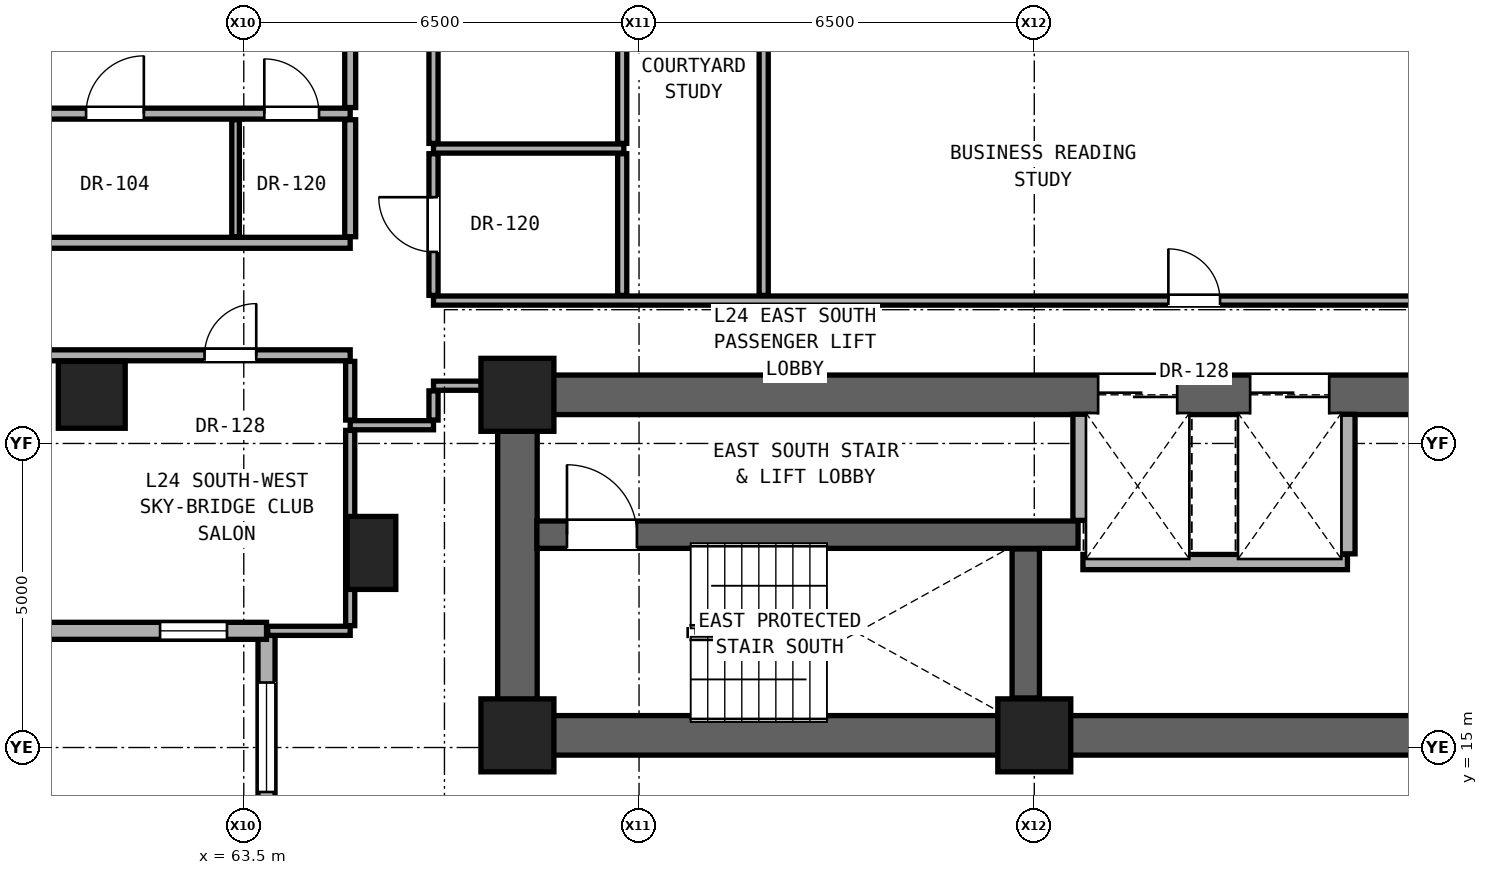
"""IFC4 building model, lengths in metres.
Left out: names, types, materials, properties, quantities, classifications, styles, units other than length and angle.
Written with IfcOpenShell. Run it as: python <this file> out.ifc"""

import sys

from ifc_helpers import new_model, si_unit, direction, frame, frame_2d, origin, origin_2d, place, context, subcontext, project, spatial, rectangle, hollow_rectangle, extrude, element, fill, save


model = new_model("IFC4")
c1 = context("Model", 3, precision=1e-05, world=origin(), true_north=direction((0.0, 1.0)))
c2 = subcontext(c1, "Body", "Model", "MODEL_VIEW")
j1 = project(units=[si_unit("LENGTHUNIT", "METRE"), si_unit("PLANEANGLEUNIT", "RADIAN")], contexts=[c1])
p1 = place(None, origin())
s1 = spatial("IfcSite", under=j1, at=p1, CompositionType="ELEMENT")
p2 = place(p1, origin())
s2 = spatial("IfcBuilding", under=s1, at=p2, CompositionType="ELEMENT")
p3 = place(p2, frame((0.0, 0.0, 88.4)))
s3 = spatial("IfcBuildingStorey", under=s2, at=p3, CompositionType="ELEMENT", Elevation=88.4)
for number, where, z_axis, x_axis in (
    (1, (68.0, 15.2, 0.0), (0.0, 0.0, 1.0), (1.0, 0.0, 0.0)),
    (2, (76.5, 15.2, 0.0), (0.0, 0.0, 1.0), (1.0, 0.0, 0.0)),
    (3, (68.0, 20.8, 0.0), (0.0, 0.0, 1.0), (1.0, 0.0, 0.0)),
):
    element("IfcColumn", number, at=place(p3, frame(where, z_axis=z_axis, x_axis=x_axis)), inside=s3, PredefinedType="COLUMN", context=c2, shape_type="SweptSolid", body=[
        extrude(rectangle(XDim=1.2, YDim=1.2, at=origin_2d()), origin(), (0.0, 0.0, 1.0), 3.3),
    ])
p4 = place(p3, frame((61.0, 20.8, 0.0), z_axis=(0.0, 0.0, 1.0), x_axis=(1.0, 0.0, 0.0)))
e4 = element("IfcColumn", 4, at=p4, inside=s3, PredefinedType="COLUMN", context=c2, shape_type="SweptSolid", body=[
    extrude(hollow_rectangle(XDim=1.1, YDim=1.1, WallThickness=0.06, at=origin_2d()), origin(), (0.0, 0.0, 1.0), 3.3),
])
p5 = place(p3, frame((65.6, 18.2, 0.0), z_axis=(0.0, 0.0, 1.0), x_axis=(1.0, 0.0, 0.0)))
e5 = element("IfcColumn", 5, at=p5, inside=s3, PredefinedType="PILASTER", context=c2, shape_type="SweptSolid", body=[
    extrude(rectangle(XDim=0.8, YDim=1.2, at=origin_2d()), origin(), (0.0, 0.0, 1.0), 3.3),
])
p6 = place(p3, frame((68.0, 15.2, 0.0), z_axis=(0.0, 0.0, 1.0), x_axis=(1.0, 0.0, 0.0)))
e6 = element("IfcWall", 6, at=p6, inside=s3, PredefinedType="SHEAR", context=c2, shape_type="SweptSolid", body=[
    extrude(rectangle(XDim=17.0, YDim=0.65, at=frame_2d((8.5, 0.0))), origin(), (0.0, 0.0, 1.0), 3.08),
])
p7 = place(p3, frame((68.0, 15.2, 0.0), z_axis=(0.0, 0.0, 1.0), x_axis=(0.0, 1.0, 0.0)))
e7 = element("IfcWall", 7, at=p7, inside=s3, PredefinedType="SHEAR", context=c2, shape_type="SweptSolid", body=[
    extrude(rectangle(XDim=5.6, YDim=0.65, at=frame_2d((2.8, 0.0))), origin(), (0.0, 0.0, 1.0), 3.08),
])
p8 = place(p3, frame((68.0, 20.8, 0.0), z_axis=(0.0, 0.0, 1.0), x_axis=(1.0, 0.0, 0.0)))
e8 = element("IfcWall", 8, at=p8, inside=s3, PredefinedType="SHEAR", context=c2, shape_type="SweptSolid", body=[
    extrude(rectangle(XDim=17.0, YDim=0.65, at=frame_2d((8.5, 0.0))), origin(), (0.0, 0.0, 1.0), 3.08),
])
p9 = place(p8, frame((9.55, 0.0, 0.0)))
e9 = element("IfcOpeningElement", 9, at=p9, cuts=e8, PredefinedType="OPENING", context=c2, shape_type="SweptSolid", body=[
    extrude(rectangle(XDim=1.3, YDim=2.3, at=frame_2d((0.65, 1.15))), frame((0.0, 0.335, 0.0), z_axis=(0.0, -1.0, 0.0), x_axis=(1.0, 0.0, 0.0)), (0.0, 0.0, 1.0), 0.67),
])
p10 = place(p8, frame((12.05, 0.0, 0.0)))
e10 = element("IfcOpeningElement", 10, at=p10, cuts=e8, PredefinedType="OPENING", context=c2, shape_type="SweptSolid", body=[
    extrude(rectangle(XDim=1.3, YDim=2.3, at=frame_2d((0.65, 1.15))), frame((0.0, 0.335, 0.0), z_axis=(0.0, -1.0, 0.0), x_axis=(1.0, 0.0, 0.0)), (0.0, 0.0, 1.0), 0.67),
])
p11 = place(p3, frame((63.874, 16.919, 0.0), z_axis=(0.0, 0.0, 1.0), x_axis=(0.0, -1.0, 0.0)))
e11 = element("IfcWall", 11, at=p11, inside=s3, PredefinedType="SOLIDWALL", context=c2, shape_type="SweptSolid", body=[
    extrude(rectangle(XDim=4.516, YDim=0.28, at=frame_2d((2.258, 0.0))), origin(), (0.0, 0.0, 1.0), 3.06),
])
p12 = place(p11, frame((0.85, 0.0, 0.81)))
e12 = element("IfcOpeningElement", 12, at=p12, cuts=e11, PredefinedType="OPENING", context=c2, shape_type="SweptSolid", body=[
    extrude(rectangle(XDim=1.8, YDim=2.1, at=frame_2d((0.9, 1.05))), frame((0.0, 0.15, 0.0), z_axis=(0.0, -1.0, 0.0), x_axis=(1.0, 0.0, 0.0)), (0.0, 0.0, 1.0), 0.3),
])
p13 = place(p3, frame((59.357, 16.919, 0.0), z_axis=(0.0, 0.0, 1.0), x_axis=(1.0, 0.0, 0.0)))
e13 = element("IfcWall", 13, at=p13, inside=s3, PredefinedType="SOLIDWALL", context=c2, shape_type="SweptSolid", body=[
    extrude(rectangle(XDim=4.516, YDim=0.28, at=frame_2d((2.258, 0.0))), origin(), (0.0, 0.0, 1.0), 3.06),
])
p14 = place(p13, frame((2.766, 0.0, 0.85)))
e14 = element("IfcOpeningElement", 14, at=p14, cuts=e13, PredefinedType="OPENING", context=c2, shape_type="SweptSolid", body=[
    extrude(rectangle(XDim=1.1, YDim=2.0, at=frame_2d((0.55, 1.0))), frame((0.0, 0.15, 0.0), z_axis=(0.0, -1.0, 0.0), x_axis=(1.0, 0.0, 0.0)), (0.0, 0.0, 1.0), 0.3),
])
p15 = place(p3, frame((63.894, 16.919, 0.0), z_axis=(0.0, 0.0, 1.0), x_axis=(1.0, 0.0, 0.0)))
e15 = element("IfcWall", 15, at=p15, inside=s3, PredefinedType="PARTITIONING", context=c2, shape_type="SweptSolid", body=[
    extrude(rectangle(XDim=1.356, YDim=0.15, at=frame_2d((0.678, 0.0))), origin(), (0.0, 0.0, 1.0), 3.08),
])
p16 = place(p3, frame((77.3, 18.05, 0.0), z_axis=(0.0, 0.0, 1.0), x_axis=(1.0, 0.0, 0.0)))
e16 = element("IfcWall", 16, at=p16, inside=s3, PredefinedType="SOLIDWALL", context=c2, shape_type="SweptSolid", body=[
    extrude(rectangle(XDim=4.35, YDim=0.25, at=frame_2d((2.175, 0.0))), origin(), (0.0, 0.0, 1.0), 3.08),
])
p17 = place(p3, frame((68.32, 18.5, 0.0), z_axis=(0.0, 0.0, 1.0), x_axis=(1.0, 0.0, 0.0)))
e17 = element("IfcWall", 17, at=p17, inside=s3, PredefinedType="SHEAR", context=c2, shape_type="SweptSolid", body=[
    extrude(rectangle(XDim=8.9, YDim=0.45, at=frame_2d((4.45, 0.0))), origin(), (0.0, 0.0, 1.0), 3.08),
])
p18 = place(p17, frame((0.495, 0.0, 0.0)))
e18 = element("IfcOpeningElement", 18, at=p18, cuts=e17, PredefinedType="OPENING", context=c2, shape_type="SweptSolid", body=[
    extrude(rectangle(XDim=1.15, YDim=2.2, at=frame_2d((0.575, 1.1))), frame((0.0, 0.235, 0.0), z_axis=(0.0, -1.0, 0.0), x_axis=(1.0, 0.0, 0.0)), (0.0, 0.0, 1.0), 0.47),
])
p19 = place(p3, frame((65.25, 20.3, 0.0), z_axis=(0.0, 0.0, 1.0), x_axis=(1.0, 0.0, 0.0)))
e19 = element("IfcWall", 19, at=p19, inside=s3, PredefinedType="PARTITIONING", context=c2, shape_type="SweptSolid", body=[
    extrude(rectangle(XDim=1.37, YDim=0.15, at=frame_2d((0.685, 0.0))), origin(), (0.0, 0.0, 1.0), 3.08),
])
p20 = place(p3, frame((66.62, 20.95, 0.0), z_axis=(0.0, 0.0, 1.0), x_axis=(1.0, 0.0, 0.0)))
e20 = element("IfcWall", 20, at=p20, inside=s3, PredefinedType="PARTITIONING", context=c2, shape_type="SweptSolid", body=[
    extrude(rectangle(XDim=1.06, YDim=0.15, at=frame_2d((0.53, 0.0))), origin(), (0.0, 0.0, 1.0), 2.472),
])
p21 = place(p3, frame((58.738, 21.45, 0.0), z_axis=(0.0, 0.0, 1.0), x_axis=(1.0, 0.0, 0.0)))
e21 = element("IfcWall", 21, at=p21, inside=s3, PredefinedType="PARTITIONING", context=c2, shape_type="SweptSolid", body=[
    extrude(rectangle(XDim=6.512, YDim=0.18, at=frame_2d((3.256, 0.0))), origin(), (0.0, 0.0, 1.0), 2.085),
])
p22 = place(p21, frame((4.117, 0.0, 0.0)))
e22 = element("IfcOpeningElement", 22, at=p22, cuts=e21, PredefinedType="OPENING", context=c2, shape_type="SweptSolid", body=[
    extrude(rectangle(XDim=0.85, YDim=2.01, at=frame_2d((0.425, 1.005))), frame((0.0, 0.1, 0.0), z_axis=(0.0, -1.0, 0.0), x_axis=(1.0, 0.0, 0.0)), (0.0, 0.0, 1.0), 0.2),
])
p23 = place(p3, frame((66.62, 22.35, 0.0), z_axis=(0.0, 0.0, 1.0), x_axis=(1.0, 0.0, 0.0)))
e23 = element("IfcWall", 23, at=p23, inside=s3, PredefinedType="PARTITIONING", context=c2, shape_type="SweptSolid", body=[
    extrude(rectangle(XDim=19.63, YDim=0.15, at=frame_2d((9.815, 0.0))), origin(), (0.0, 0.0, 1.0), 2.145),
])
p24 = place(p23, frame((12.085, 0.0, 0.0)))
e24 = element("IfcOpeningElement", 24, at=p24, cuts=e23, PredefinedType="OPENING", context=c2, shape_type="SweptSolid", body=[
    extrude(rectangle(XDim=0.85, YDim=2.01, at=frame_2d((0.425, 1.005))), frame((0.0, 0.085, 0.0), z_axis=(0.0, -1.0, 0.0), x_axis=(1.0, 0.0, 0.0)), (0.0, 0.0, 1.0), 0.17),
])
p25 = place(p3, frame((32.14, 23.3, 0.0), z_axis=(0.0, 0.0, 1.0), x_axis=(1.0, 0.0, 0.0)))
e25 = element("IfcWall", 25, at=p25, inside=s3, PredefinedType="PARTITIONING", context=c2, shape_type="SweptSolid", body=[
    extrude(rectangle(XDim=33.11, YDim=0.18, at=frame_2d((16.555, 0.0))), origin(), (0.0, 0.0, 1.0), 2.145),
])
p26 = place(p25, frame((12.335, 0.0, 0.0)))
e26 = element("IfcOpeningElement", 26, at=p26, cuts=e25, PredefinedType="OPENING", context=c2, shape_type="SweptSolid", body=[
    extrude(rectangle(XDim=0.85, YDim=2.01, at=frame_2d((0.425, 1.005))), frame((0.0, 0.1, 0.0), z_axis=(0.0, -1.0, 0.0), x_axis=(1.0, 0.0, 0.0)), (0.0, 0.0, 1.0), 0.2),
])
p27 = place(p25, frame((19.504, 0.0, 0.0)))
e27 = element("IfcOpeningElement", 27, at=p27, cuts=e25, PredefinedType="OPENING", context=c2, shape_type="SweptSolid", body=[
    extrude(rectangle(XDim=0.85, YDim=2.01, at=frame_2d((0.425, 1.005))), frame((0.0, 0.1, 0.0), z_axis=(0.0, -1.0, 0.0), x_axis=(1.0, 0.0, 0.0)), (0.0, 0.0, 1.0), 0.2),
])
p28 = place(p25, frame((24.398, 0.0, 0.0)))
e28 = element("IfcOpeningElement", 28, at=p28, cuts=e25, PredefinedType="OPENING", context=c2, shape_type="SweptSolid", body=[
    extrude(rectangle(XDim=0.9, YDim=2.1, at=frame_2d((0.45, 1.05))), frame((0.0, 0.1, 0.0), z_axis=(0.0, -1.0, 0.0), x_axis=(1.0, 0.0, 0.0)), (0.0, 0.0, 1.0), 0.2),
])
p29 = place(p3, frame((66.62, 24.85, 0.0), z_axis=(0.0, 0.0, 1.0), x_axis=(1.0, 0.0, 0.0)))
e29 = element("IfcWall", 29, at=p29, inside=s3, PredefinedType="PARTITIONING", context=c2, shape_type="SweptSolid", body=[
    extrude(rectangle(XDim=3.13, YDim=0.15, at=frame_2d((1.565, 0.0))), origin(), (0.0, 0.0, 1.0), 2.145),
])
p30 = place(p3, frame((59.358, 25.424, 0.0), z_axis=(0.0, 0.0, 1.0), x_axis=(1.0, 0.0, 0.0)))
e30 = element("IfcWall", 30, at=p30, inside=s3, PredefinedType="PARTITIONING", context=c2, shape_type="SweptSolid", body=[
    extrude(rectangle(XDim=5.892, YDim=0.18, at=frame_2d((2.946, 0.0))), origin(), (0.0, 0.0, 1.0), 2.216),
])
p31 = place(p30, frame((1.549, 0.0, 0.0)))
e31 = element("IfcOpeningElement", 31, at=p31, cuts=e30, PredefinedType="OPENING", context=c2, shape_type="SweptSolid", body=[
    extrude(rectangle(XDim=0.95, YDim=2.15, at=frame_2d((0.475, 1.075))), frame((0.0, 0.1, 0.0), z_axis=(0.0, -1.0, 0.0), x_axis=(1.0, 0.0, 0.0)), (0.0, 0.0, 1.0), 0.2),
])
p32 = place(p30, frame((4.479, 0.0, 0.0)))
e32 = element("IfcOpeningElement", 32, at=p32, cuts=e30, PredefinedType="OPENING", context=c2, shape_type="SweptSolid", body=[
    extrude(rectangle(XDim=0.9, YDim=2.1, at=frame_2d((0.45, 1.05))), frame((0.0, 0.1, 0.0), z_axis=(0.0, -1.0, 0.0), x_axis=(1.0, 0.0, 0.0)), (0.0, 0.0, 1.0), 0.2),
])
p33 = place(p3, frame((63.365, 23.4, 0.0), z_axis=(0.0, 0.0, 1.0), x_axis=(0.0, 1.0, 0.0)))
e33 = element("IfcWall", 33, at=p33, inside=s3, PredefinedType="PARTITIONING", context=c2, shape_type="SweptSolid", body=[
    extrude(rectangle(XDim=1.924, YDim=0.125, at=frame_2d((0.962, 0.0))), origin(), (0.0, 0.0, 1.0), 3.08),
])
p34 = place(p3, frame((65.25, 17.004, 0.0), z_axis=(0.0, 0.0, 1.0), x_axis=(0.0, 1.0, 0.0)))
e34 = element("IfcWall", 34, at=p34, inside=s3, PredefinedType="PARTITIONING", context=c2, shape_type="SweptSolid", body=[
    extrude(rectangle(XDim=3.211, YDim=0.15, at=frame_2d((1.605, 0.0))), origin(), (0.0, 0.0, 1.0), 2.456),
])
p35 = place(p3, frame((65.25, 20.385, 0.0), z_axis=(0.0, 0.0, 1.0), x_axis=(0.0, 1.0, 0.0)))
e35 = element("IfcWall", 35, at=p35, inside=s3, PredefinedType="PARTITIONING", context=c2, shape_type="SweptSolid", body=[
    extrude(rectangle(XDim=0.965, YDim=0.15, at=frame_2d((0.482, 0.0))), origin(), (0.0, 0.0, 1.0), 2.472),
])
p36 = place(p3, frame((65.25, 23.4, 0.0), z_axis=(0.0, 0.0, 1.0), x_axis=(0.0, 1.0, 0.0)))
e36 = element("IfcWall", 36, at=p36, inside=s3, PredefinedType="PARTITIONING", context=c2, shape_type="SweptSolid", body=[
    extrude(rectangle(XDim=1.924, YDim=0.18, at=frame_2d((0.962, 0.0))), origin(), (0.0, 0.0, 1.0), 3.08),
])
p37 = place(p3, frame((65.25, 25.524, 0.0), z_axis=(0.0, 0.0, 1.0), x_axis=(0.0, 1.0, 0.0)))
e37 = element("IfcWall", 37, at=p37, inside=s3, PredefinedType="PARTITIONING", context=c2, shape_type="SweptSolid", body=[
    extrude(rectangle(XDim=3.576, YDim=0.18, at=frame_2d((1.788, 0.0))), origin(), (0.0, 0.0, 1.0), 2.299),
])
p38 = place(p37, frame((1.263, 0.0, 0.0)))
e38 = element("IfcOpeningElement", 38, at=p38, cuts=e37, PredefinedType="OPENING", context=c2, shape_type="SweptSolid", body=[
    extrude(rectangle(XDim=1.05, YDim=2.2, at=frame_2d((0.525, 1.1))), frame((0.0, 0.1, 0.0), z_axis=(0.0, -1.0, 0.0), x_axis=(1.0, 0.0, 0.0)), (0.0, 0.0, 1.0), 0.2),
])
p39 = place(p3, frame((66.62, 20.385, 0.0), z_axis=(0.0, 0.0, 1.0), x_axis=(0.0, 1.0, 0.0)))
e39 = element("IfcWall", 39, at=p39, inside=s3, PredefinedType="PARTITIONING", context=c2, shape_type="SweptSolid", body=[
    extrude(rectangle(XDim=0.48, YDim=0.15, at=frame_2d((0.24, 0.0))), origin(), (0.0, 0.0, 1.0), 2.472),
])
p40 = place(p3, frame((66.62, 22.435, 0.0), z_axis=(0.0, 0.0, 1.0), x_axis=(0.0, 1.0, 0.0)))
e40 = element("IfcWall", 40, at=p40, inside=s3, PredefinedType="PARTITIONING", context=c2, shape_type="SweptSolid", body=[
    extrude(rectangle(XDim=2.33, YDim=0.15, at=frame_2d((1.165, 0.0))), origin(), (0.0, 0.0, 1.0), 3.08),
])
p41 = place(p40, frame((0.715, 0.0, 0.0)))
e41 = element("IfcOpeningElement", 41, at=p41, cuts=e40, PredefinedType="OPENING", context=c2, shape_type="SweptSolid", body=[
    extrude(rectangle(XDim=0.9, YDim=2.1, at=frame_2d((0.45, 1.05))), frame((0.0, 0.085, 0.0), z_axis=(0.0, -1.0, 0.0), x_axis=(1.0, 0.0, 0.0)), (0.0, 0.0, 1.0), 0.17),
])
p42 = place(p3, frame((66.62, 24.935, 0.0), z_axis=(0.0, 0.0, 1.0), x_axis=(0.0, 1.0, 0.0)))
e42 = element("IfcWall", 42, at=p42, inside=s3, PredefinedType="PARTITIONING", context=c2, shape_type="SweptSolid", body=[
    extrude(rectangle(XDim=5.63, YDim=0.15, at=frame_2d((2.815, 0.0))), origin(), (0.0, 0.0, 1.0), 2.299),
])
p43 = place(p42, frame((2.34, 0.0, 0.0)))
e43 = element("IfcOpeningElement", 43, at=p43, cuts=e42, PredefinedType="OPENING", context=c2, shape_type="SweptSolid", body=[
    extrude(rectangle(XDim=0.95, YDim=2.15, at=frame_2d((0.475, 1.075))), frame((0.0, 0.085, 0.0), z_axis=(0.0, -1.0, 0.0), x_axis=(1.0, 0.0, 0.0)), (0.0, 0.0, 1.0), 0.17),
])
p44 = place(p3, frame((69.723, 22.435, 0.0), z_axis=(0.0, 0.0, 1.0), x_axis=(0.0, 1.0, 0.0)))
e44 = element("IfcWall", 44, at=p44, inside=s3, PredefinedType="PARTITIONING", context=c2, shape_type="SweptSolid", body=[
    extrude(rectangle(XDim=2.33, YDim=0.15, at=frame_2d((1.165, 0.0))), origin(), (0.0, 0.0, 1.0), 3.08),
])
p45 = place(p3, frame((69.723, 24.935, 0.0), z_axis=(0.0, 0.0, 1.0), x_axis=(0.0, 1.0, 0.0)))
e45 = element("IfcWall", 45, at=p45, inside=s3, PredefinedType="PARTITIONING", context=c2, shape_type="SweptSolid", body=[
    extrude(rectangle(XDim=5.63, YDim=0.15, at=frame_2d((2.815, 0.0))), origin(), (0.0, 0.0, 1.0), 2.145),
])
p46 = place(p3, frame((72.05, 22.435, 0.0), z_axis=(0.0, 0.0, 1.0), x_axis=(0.0, 1.0, 0.0)))
e46 = element("IfcWall", 46, at=p46, inside=s3, PredefinedType="PARTITIONING", context=c2, shape_type="SweptSolid", body=[
    extrude(rectangle(XDim=4.312, YDim=0.15, at=frame_2d((2.156, 0.0))), origin(), (0.0, 0.0, 1.0), 2.609),
])
p47 = place(p3, frame((76.36, 15.815, 0.0), z_axis=(0.0, 0.0, 1.0), x_axis=(0.0, 1.0, 0.0)))
e47 = element("IfcWall", 47, at=p47, inside=s3, PredefinedType="SHEAR", context=c2, shape_type="SweptSolid", body=[
    extrude(rectangle(XDim=2.45, YDim=0.45, at=frame_2d((1.225, 0.0))), origin(), (0.0, 0.0, 1.0), 3.08),
])
p48 = place(p3, frame((77.26, 18.735, 0.0), z_axis=(0.0, 0.0, 1.0), x_axis=(0.0, 1.0, 0.0)))
e48 = element("IfcWall", 48, at=p48, inside=s3, PredefinedType="SOLIDWALL", context=c2, shape_type="SweptSolid", body=[
    extrude(rectangle(XDim=1.745, YDim=0.25, at=frame_2d((0.873, 0.0))), origin(), (0.0, 0.0, 1.0), 3.08),
])
p49 = place(p3, frame((81.65, 18.185, 0.0), z_axis=(0.0, 0.0, 1.0), x_axis=(0.0, 1.0, 0.0)))
e49 = element("IfcWall", 49, at=p49, inside=s3, PredefinedType="SOLIDWALL", context=c2, shape_type="SweptSolid", body=[
    extrude(rectangle(XDim=2.295, YDim=0.25, at=frame_2d((1.147, 0.0))), origin(), (0.0, 0.0, 1.0), 3.08),
])
p50 = place(p12, origin())
e50 = element("IfcWindow", 50, at=p50, inside=s3, PartitioningType="SINGLE_PANEL", PredefinedType="WINDOW", context=c2, shape_type="SweptSolid", body=[
    extrude(rectangle(XDim=1.8, YDim=2.1, at=frame_2d((0.9, 1.05))), frame((0.0, 0.03, 0.0), z_axis=(0.0, -1.0, 0.0), x_axis=(1.0, 0.0, 0.0)), (0.0, 0.0, 1.0), 0.06),
])
fill(e12, e50)
p51 = place(p14, origin())
e51 = element("IfcWindow", 51, at=p51, inside=s3, PartitioningType="SINGLE_PANEL", PredefinedType="WINDOW", context=c2, shape_type="SweptSolid", body=[
    extrude(rectangle(XDim=1.1, YDim=2.0, at=frame_2d((0.55, 1.0))), frame((0.0, 0.03, 0.0), z_axis=(0.0, -1.0, 0.0), x_axis=(1.0, 0.0, 0.0)), (0.0, 0.0, 1.0), 0.06),
])
fill(e14, e51)
p52 = place(p18, origin())
e52 = element("IfcDoor", 52, at=p52, inside=s3, OperationType="SINGLE_SWING_LEFT", PredefinedType="DOOR", context=c2, shape_type="SweptSolid", body=[
    extrude(rectangle(XDim=1.15, YDim=2.2, at=frame_2d((0.575, 1.1))), frame((0.0, 0.025, 0.0), z_axis=(0.0, -1.0, 0.0), x_axis=(1.0, 0.0, 0.0)), (0.0, 0.0, 1.0), 0.05),
])
fill(e18, e52)
p53 = place(p41, origin())
e53 = element("IfcDoor", 53, at=p53, inside=s3, OperationType="SINGLE_SWING_RIGHT", PredefinedType="DOOR", context=c2, shape_type="SweptSolid", body=[
    extrude(rectangle(XDim=0.9, YDim=2.1, at=frame_2d((0.45, 1.05))), frame((0.0, 0.025, 0.0), z_axis=(0.0, -1.0, 0.0), x_axis=(1.0, 0.0, 0.0)), (0.0, 0.0, 1.0), 0.05),
])
fill(e41, e53)
p54 = place(p31, origin())
e54 = element("IfcDoor", 54, at=p54, inside=s3, OperationType="SINGLE_SWING_RIGHT", PredefinedType="DOOR", context=c2, shape_type="SweptSolid", body=[
    extrude(rectangle(XDim=0.95, YDim=2.15, at=frame_2d((0.475, 1.075))), frame((0.0, 0.025, 0.0), z_axis=(0.0, -1.0, 0.0), x_axis=(1.0, 0.0, 0.0)), (0.0, 0.0, 1.0), 0.05),
])
fill(e31, e54)
p55 = place(p32, origin())
e55 = element("IfcDoor", 55, at=p55, inside=s3, OperationType="SINGLE_SWING_LEFT", PredefinedType="DOOR", context=c2, shape_type="SweptSolid", body=[
    extrude(rectangle(XDim=0.9, YDim=2.1, at=frame_2d((0.45, 1.05))), frame((0.0, 0.025, 0.0), z_axis=(0.0, -1.0, 0.0), x_axis=(1.0, 0.0, 0.0)), (0.0, 0.0, 1.0), 0.05),
])
fill(e32, e55)
p56 = place(p24, origin())
e56 = element("IfcDoor", 56, at=p56, inside=s3, OperationType="SINGLE_SWING_LEFT", PredefinedType="DOOR", context=c2, shape_type="SweptSolid", body=[
    extrude(rectangle(XDim=0.85, YDim=2.01, at=frame_2d((0.425, 1.005))), frame((0.0, 0.025, 0.0), z_axis=(0.0, -1.0, 0.0), x_axis=(1.0, 0.0, 0.0)), (0.0, 0.0, 1.0), 0.05),
])
fill(e24, e56)
p57 = place(p22, origin())
e57 = element("IfcDoor", 57, at=p57, inside=s3, OperationType="SINGLE_SWING_RIGHT", PredefinedType="DOOR", context=c2, shape_type="SweptSolid", body=[
    extrude(rectangle(XDim=0.85, YDim=2.01, at=frame_2d((0.425, 1.005))), frame((0.0, 0.025, 0.0), z_axis=(0.0, -1.0, 0.0), x_axis=(1.0, 0.0, 0.0)), (0.0, 0.0, 1.0), 0.05),
])
fill(e22, e57)
p58 = place(p9, origin())
e58 = element("IfcDoor", 58, at=p58, inside=s3, OperationType="DOUBLE_DOOR_SLIDING", PredefinedType="DOOR", context=c2, shape_type="SweptSolid", body=[
    extrude(rectangle(XDim=1.3, YDim=2.3, at=frame_2d((0.65, 1.15))), frame((0.0, 0.025, 0.0), z_axis=(0.0, -1.0, 0.0), x_axis=(1.0, 0.0, 0.0)), (0.0, 0.0, 1.0), 0.05),
])
fill(e9, e58)
p59 = place(p10, origin())
e59 = element("IfcDoor", 59, at=p59, inside=s3, OperationType="DOUBLE_DOOR_SLIDING", PredefinedType="DOOR", context=c2, shape_type="SweptSolid", body=[
    extrude(rectangle(XDim=1.3, YDim=2.3, at=frame_2d((0.65, 1.15))), frame((0.0, 0.025, 0.0), z_axis=(0.0, -1.0, 0.0), x_axis=(1.0, 0.0, 0.0)), (0.0, 0.0, 1.0), 0.05),
])
fill(e10, e59)
save(model, sys.argv[1])
